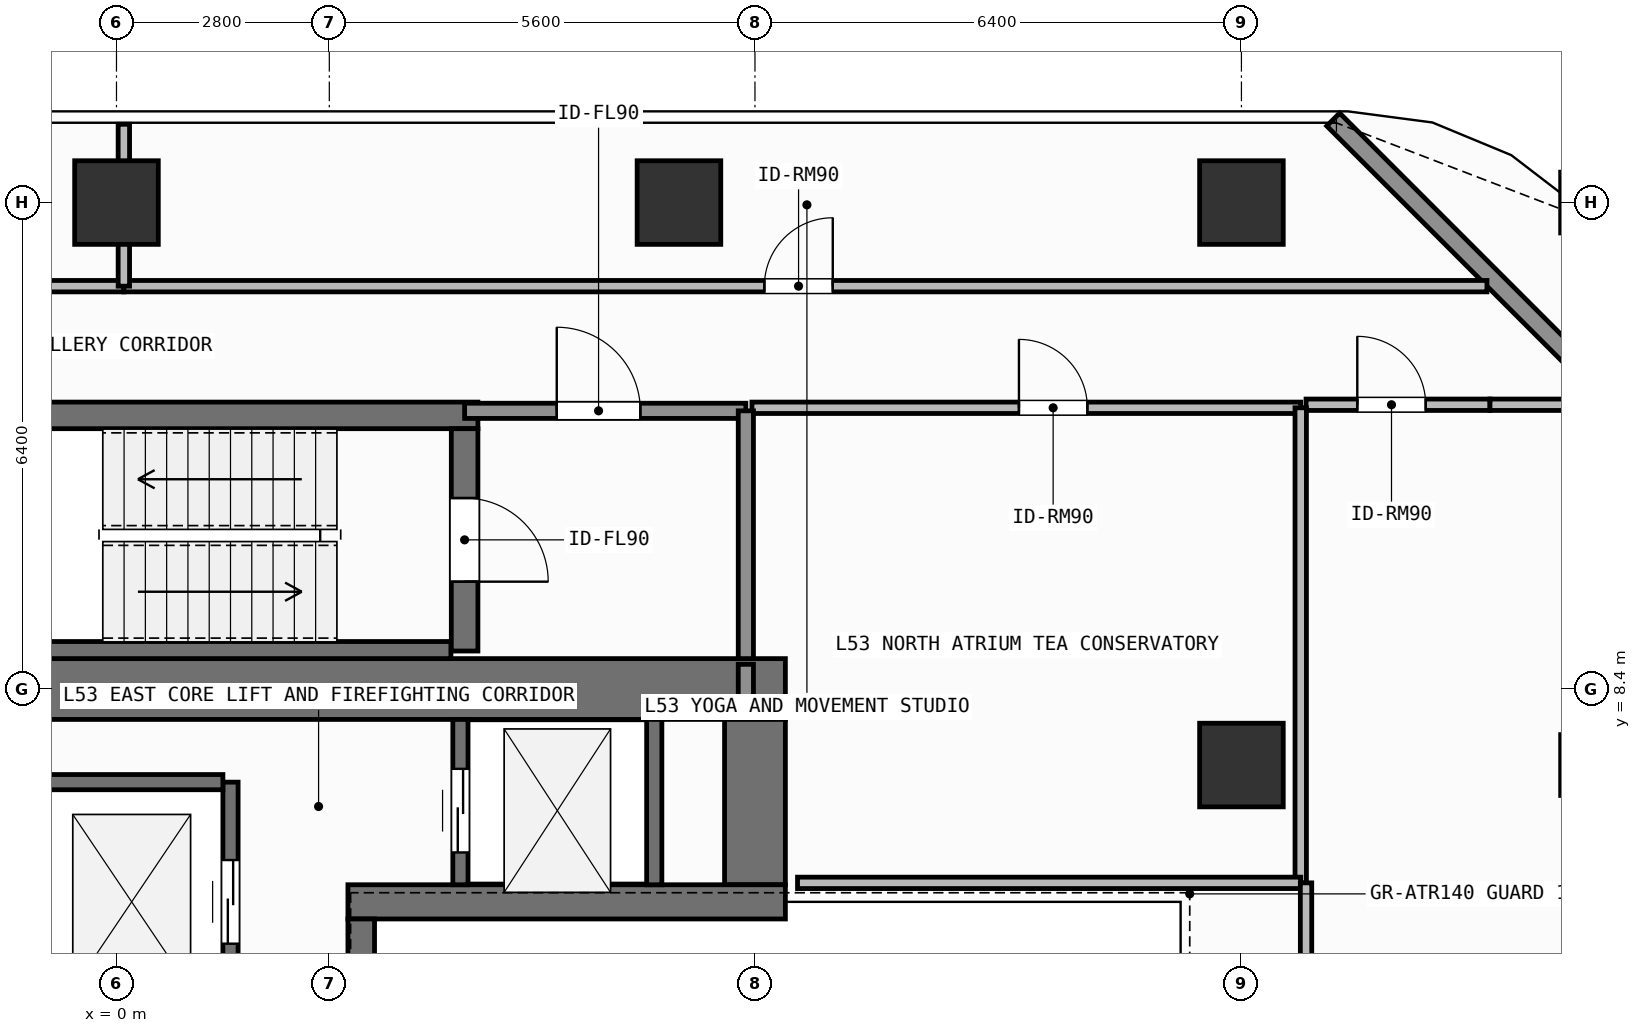
"""IFC4 building model, lengths in metres.
Left out: names, types, materials, properties, quantities, classifications, styles, units other than length and angle.
Written with IfcOpenShell. Run it as: python <this file> out.ifc"""

import sys

from ifc_helpers import new_model, si_unit, direction, frame, frame_2d, origin, origin_2d, place, context, subcontext, project, spatial, rectangle, hollow_rectangle, extrude, element, fill, save


model = new_model("IFC4")
c1 = context("Model", 3, precision=1e-05, world=origin(), true_north=direction((0.0, 1.0)))
c2 = subcontext(c1, "Body", "Model", "MODEL_VIEW")
j1 = project(units=[si_unit("LENGTHUNIT", "METRE"), si_unit("PLANEANGLEUNIT", "RADIAN")], contexts=[c1])
p1 = place(None, origin())
s1 = spatial("IfcSite", under=j1, at=p1, CompositionType="ELEMENT")
p2 = place(p1, origin())
s2 = spatial("IfcBuilding", under=s1, at=p2, CompositionType="ELEMENT")
p3 = place(p2, frame((0.0, 0.0, 215.7)))
s3 = spatial("IfcBuildingStorey", under=s2, at=p3, CompositionType="ELEMENT", Elevation=215.7)
p4 = place(p3, frame((-7.55, 8.4, 0.0), z_axis=(0.0, 0.0, 1.0), x_axis=(1.0, 0.0, 0.0)))
e1 = element("IfcWall", 1, at=p4, inside=s3, PredefinedType="SHEAR", context=c2, shape_type="SweptSolid", body=[
    extrude(rectangle(XDim=16.35, YDim=0.8, at=frame_2d((8.175, 0.0))), origin(), (0.0, 0.0, 1.0), 3.9),
])
p5 = place(p3, frame((8.4, 5.825, 0.0), z_axis=(0.0, 0.0, 1.0), x_axis=(0.0, 1.0, 0.0)))
e2 = element("IfcWall", 2, at=p5, inside=s3, PredefinedType="SHEAR", context=c2, shape_type="SweptSolid", body=[
    extrude(rectangle(XDim=2.175, YDim=0.8, at=frame_2d((1.087, 0.0))), origin(), (0.0, 0.0, 1.0), 3.9),
])
p6 = place(p3, frame((3.045, 5.6, 0.0), z_axis=(0.0, 0.0, 1.0), x_axis=(1.0, 0.0, 0.0)))
e3 = element("IfcWall", 3, at=p6, inside=s3, PredefinedType="SHEAR", context=c2, shape_type="SweptSolid", body=[
    extrude(rectangle(XDim=5.755, YDim=0.45, at=frame_2d((2.877, 0.0))), origin(), (0.0, 0.0, 1.0), 3.9),
])
p7 = place(p3, frame((3.22, -5.375, 0.0), z_axis=(0.0, 0.0, 1.0), x_axis=(0.0, 1.0, 0.0)))
e4 = element("IfcWall", 4, at=p7, inside=s3, PredefinedType="SHEAR", context=c2, shape_type="SweptSolid", body=[
    extrude(rectangle(XDim=10.75, YDim=0.35, at=frame_2d((5.375, 0.0))), origin(), (0.0, 0.0, 1.0), 3.9),
])
p8 = place(p3, frame((-2.555, 12.0, 0.0), z_axis=(0.0, 0.0, 1.0), x_axis=(1.0, 0.0, 0.0)))
e5 = element("IfcWall", 5, at=p8, inside=s3, PredefinedType="SHEAR", context=c2, shape_type="SweptSolid", body=[
    extrude(rectangle(XDim=7.31, YDim=0.35, at=frame_2d((3.655, 0.0))), origin(), (0.0, 0.0, 1.0), 3.9),
])
p9 = place(p3, frame((-2.2, 8.913, 0.0), z_axis=(0.0, 0.0, 1.0), x_axis=(1.0, 0.0, 0.0)))
e6 = element("IfcWall", 6, at=p9, inside=s3, PredefinedType="SHEAR", context=c2, shape_type="SweptSolid", body=[
    extrude(rectangle(XDim=6.6, YDim=0.225, at=frame_2d((3.3, 0.0))), origin(), (0.0, 0.0, 1.0), 3.9),
])
p10 = place(p3, frame((4.58, 11.825, 0.0), z_axis=(0.0, 0.0, 1.0), x_axis=(0.0, -1.0, 0.0)))
e7 = element("IfcWall", 7, at=p10, inside=s3, PredefinedType="SHEAR", context=c2, shape_type="SweptSolid", body=[
    extrude(rectangle(XDim=2.925, YDim=0.35, at=frame_2d((1.462, 0.0))), origin(), (0.0, 0.0, 1.0), 3.9),
])
p11 = place(p10, frame((0.913, 0.0, 0.0)))
e8 = element("IfcOpeningElement", 8, at=p11, cuts=e7, PredefinedType="OPENING", context=c2, shape_type="SweptSolid", body=[
    extrude(rectangle(XDim=1.1, YDim=2.15, at=frame_2d((0.55, 1.075))), frame((0.0, 0.185, 0.0), z_axis=(0.0, -1.0, 0.0), x_axis=(1.0, 0.0, 0.0)), (0.0, 0.0, 1.0), 0.37),
])
for number, where, z_axis, x_axis in (
    (9, (0.0, 14.8, 0.0), (0.0, 0.0, 1.0), (1.0, 0.0, 0.0)),
    (10, (7.4, 14.8, 0.0), (0.0, 0.0, 1.0), (1.0, 0.0, 0.0)),
    (11, (14.8, 14.8, 0.0), (0.0, 0.0, 1.0), (1.0, 0.0, 0.0)),
    (12, (14.8, 7.4, 0.0), (0.0, 0.0, 1.0), (1.0, 0.0, 0.0)),
):
    element("IfcColumn", number, at=place(p3, frame(where, z_axis=z_axis, x_axis=x_axis)), inside=s3, PredefinedType="COLUMN", context=c2, shape_type="SweptSolid", body=[
        extrude(rectangle(XDim=1.1, YDim=1.1, at=origin_2d()), origin(), (0.0, 0.0, 1.0), 3.9),
    ])
for number, where, z_axis, x_axis in (
    (13, (19.4, 7.4, 0.0), (0.0, 0.0, 1.0), (1.0, 0.0, 0.0)),
    (14, (19.4, 14.8, 0.0), (0.0, 0.0, 1.0), (1.0, 0.0, 0.0)),
):
    element("IfcColumn", number, at=place(p3, frame(where, z_axis=z_axis, x_axis=x_axis)), inside=s3, PredefinedType="COLUMN", context=c2, shape_type="SweptSolid", body=[
        extrude(hollow_rectangle(XDim=0.8, YDim=0.8, WallThickness=0.036, at=origin_2d()), origin(), (0.0, 0.0, 1.0), 3.9),
    ])
p12 = place(p3, frame((16.008, 15.892, 0.0), z_axis=(0.0, 0.0, 1.0), x_axis=(0.707106781187, -0.707106781187, 0.0)))
e15 = element("IfcWall", 15, at=p12, inside=s3, PredefinedType="SOLIDWALL", context=c2, shape_type="SweptSolid", body=[
    extrude(rectangle(XDim=6.201, YDim=0.24, at=frame_2d((3.101, 0.0))), origin(), (0.0, 0.0, 1.0), 3.62),
])
p13 = place(p3, frame((1.5, 4.025, 0.0), z_axis=(0.0, 0.0, 1.0), x_axis=(0.0, 1.0, 0.0)))
e16 = element("IfcWall", 16, at=p13, inside=s3, PredefinedType="SHEAR", context=c2, shape_type="SweptSolid", body=[
    extrude(rectangle(XDim=3.15, YDim=0.2, at=frame_2d((1.575, 0.0))), origin(), (0.0, 0.0, 1.0), 3.62),
])
p14 = place(p13, frame((1.025, 0.0, 0.0)))
e17 = element("IfcOpeningElement", 17, at=p14, cuts=e16, PredefinedType="OPENING", context=c2, shape_type="SweptSolid", body=[
    extrude(rectangle(XDim=1.1, YDim=2.2, at=frame_2d((0.55, 1.1))), frame((0.0, 0.11, 0.0), z_axis=(0.0, -1.0, 0.0), x_axis=(1.0, 0.0, 0.0)), (0.0, 0.0, 1.0), 0.22),
])
p15 = place(p3, frame((-1.0, 7.175, 0.0), z_axis=(0.0, 0.0, 1.0), x_axis=(1.0, 0.0, 0.0)))
e18 = element("IfcWall", 18, at=p15, inside=s3, PredefinedType="SHEAR", context=c2, shape_type="SweptSolid", body=[
    extrude(rectangle(XDim=2.4, YDim=0.2, at=frame_2d((1.2, 0.0))), origin(), (0.0, 0.0, 1.0), 3.62),
])
p16 = place(p3, frame((4.525, 5.825, 0.0), z_axis=(0.0, 0.0, 1.0), x_axis=(0.0, 1.0, 0.0)))
e19 = element("IfcWall", 19, at=p16, inside=s3, PredefinedType="SHEAR", context=c2, shape_type="SweptSolid", body=[
    extrude(rectangle(XDim=2.175, YDim=0.2, at=frame_2d((1.087, 0.0))), origin(), (0.0, 0.0, 1.0), 3.62),
])
p17 = place(p16, frame((0.425, 0.0, 0.0)))
e20 = element("IfcOpeningElement", 20, at=p17, cuts=e19, PredefinedType="OPENING", context=c2, shape_type="SweptSolid", body=[
    extrude(rectangle(XDim=1.1, YDim=2.2, at=frame_2d((0.55, 1.1))), frame((0.0, 0.11, 0.0), z_axis=(0.0, -1.0, 0.0), x_axis=(1.0, 0.0, 0.0)), (0.0, 0.0, 1.0), 0.22),
])
p18 = place(p3, frame((7.075, 5.825, 0.0), z_axis=(0.0, 0.0, 1.0), x_axis=(0.0, 1.0, 0.0)))
e21 = element("IfcWall", 21, at=p18, inside=s3, PredefinedType="SHEAR", context=c2, shape_type="SweptSolid", body=[
    extrude(rectangle(XDim=2.175, YDim=0.2, at=frame_2d((1.087, 0.0))), origin(), (0.0, 0.0, 1.0), 3.62),
])
p19 = place(p3, frame((4.58, 12.06, 0.0), z_axis=(0.0, 0.0, 1.0), x_axis=(1.0, 0.0, 0.0)))
e22 = element("IfcWall", 22, at=p19, inside=s3, PredefinedType="SOLIDWALL", context=c2, shape_type="SweptSolid", body=[
    extrude(rectangle(XDim=3.7, YDim=0.2, at=frame_2d((1.85, 0.0))), origin(), (0.0, 0.0, 1.0), 3.62),
])
p20 = place(p19, frame((1.212, 0.0, 0.0)))
e23 = element("IfcOpeningElement", 23, at=p20, cuts=e22, PredefinedType="OPENING", context=c2, shape_type="SweptSolid", body=[
    extrude(rectangle(XDim=1.1, YDim=2.15, at=frame_2d((0.55, 1.075))), frame((0.0, 0.11, 0.0), z_axis=(0.0, -1.0, 0.0), x_axis=(1.0, 0.0, 0.0)), (0.0, 0.0, 1.0), 0.22),
])
p21 = place(p3, frame((8.36, 12.1, 0.0), z_axis=(0.0, 0.0, 1.0), x_axis=(1.0, 0.0, 0.0)))
e24 = element("IfcWall", 24, at=p21, inside=s3, PredefinedType="PARTITIONING", context=c2, shape_type="SweptSolid", body=[
    extrude(rectangle(XDim=7.22, YDim=0.15, at=frame_2d((3.61, 0.0))), origin(), (0.0, 0.0, 1.0), 3.62),
])
p22 = place(p21, frame((3.513, 0.0, 0.0)))
e25 = element("IfcOpeningElement", 25, at=p22, cuts=e24, PredefinedType="OPENING", context=c2, shape_type="SweptSolid", body=[
    extrude(rectangle(XDim=0.9, YDim=2.1, at=frame_2d((0.45, 1.05))), frame((0.0, 0.085, 0.0), z_axis=(0.0, -1.0, 0.0), x_axis=(1.0, 0.0, 0.0)), (0.0, 0.0, 1.0), 0.17),
])
p23 = place(p3, frame((-13.483, 13.7, 0.0), z_axis=(0.0, 0.0, 1.0), x_axis=(1.0, 0.0, 0.0)))
e26 = element("IfcWall", 26, at=p23, inside=s3, PredefinedType="PARTITIONING", context=c2, shape_type="SweptSolid", body=[
    extrude(rectangle(XDim=13.58, YDim=0.15, at=frame_2d((6.79, 0.0))), origin(), (0.0, 0.0, 1.0), 3.62),
])
p24 = place(p23, frame((6.788, 0.0, 0.0)))
e27 = element("IfcOpeningElement", 27, at=p24, cuts=e26, PredefinedType="OPENING", context=c2, shape_type="SweptSolid", body=[
    extrude(rectangle(XDim=0.9, YDim=2.1, at=frame_2d((0.45, 1.05))), frame((0.0, 0.085, 0.0), z_axis=(0.0, -1.0, 0.0), x_axis=(1.0, 0.0, 0.0)), (0.0, 0.0, 1.0), 0.17),
])
p25 = place(p3, frame((0.097, 13.7, 0.0), z_axis=(0.0, 0.0, 1.0), x_axis=(1.0, 0.0, 0.0)))
e28 = element("IfcWall", 28, at=p25, inside=s3, PredefinedType="PARTITIONING", context=c2, shape_type="SweptSolid", body=[
    extrude(rectangle(XDim=17.933, YDim=0.15, at=frame_2d((8.967, 0.0))), origin(), (0.0, 0.0, 1.0), 3.62),
])
p26 = place(p25, frame((8.427, 0.0, 0.0)))
e29 = element("IfcOpeningElement", 29, at=p26, cuts=e28, PredefinedType="OPENING", context=c2, shape_type="SweptSolid", body=[
    extrude(rectangle(XDim=0.9, YDim=2.1, at=frame_2d((0.45, 1.05))), frame((0.0, 0.085, 0.0), z_axis=(0.0, -1.0, 0.0), x_axis=(1.0, 0.0, 0.0)), (0.0, 0.0, 1.0), 0.17),
])
p27 = place(p3, frame((15.65, 12.14, 0.0), z_axis=(0.0, 0.0, 1.0), x_axis=(1.0, 0.0, 0.0)))
e30 = element("IfcWall", 30, at=p27, inside=s3, PredefinedType="PARTITIONING", context=c2, shape_type="SweptSolid", body=[
    extrude(rectangle(XDim=2.42, YDim=0.15, at=frame_2d((1.21, 0.0))), origin(), (0.0, 0.0, 1.0), 3.62),
])
p28 = place(p27, frame((0.674, 0.0, 0.0)))
e31 = element("IfcOpeningElement", 31, at=p28, cuts=e30, PredefinedType="OPENING", context=c2, shape_type="SweptSolid", body=[
    extrude(rectangle(XDim=0.9, YDim=2.1, at=frame_2d((0.45, 1.05))), frame((0.0, 0.085, 0.0), z_axis=(0.0, -1.0, 0.0), x_axis=(1.0, 0.0, 0.0)), (0.0, 0.0, 1.0), 0.17),
])
p29 = place(p3, frame((8.28, 8.8, 0.0), z_axis=(0.0, 0.0, 1.0), x_axis=(0.0, 1.0, 0.0)))
e32 = element("IfcWall", 32, at=p29, inside=s3, PredefinedType="SOLIDWALL", context=c2, shape_type="SweptSolid", body=[
    extrude(rectangle(XDim=3.26, YDim=0.2, at=frame_2d((1.63, 0.0))), origin(), (0.0, 0.0, 1.0), 3.62),
])
p30 = place(p3, frame((8.28, 8.1, 0.0), z_axis=(0.0, 0.0, 1.0), x_axis=(0.0, 1.0, 0.0)))
e33 = element("IfcWall", 33, at=p30, inside=s3, PredefinedType="SOLIDWALL", context=c2, shape_type="SweptSolid", body=[
    extrude(rectangle(XDim=0.625, YDim=0.2, at=frame_2d((0.312, 0.0))), origin(), (0.0, 0.0, 1.0), 3.62),
])
p31 = place(p3, frame((15.58, 5.85, 0.0), z_axis=(0.0, 0.0, 1.0), x_axis=(0.0, 1.0, 0.0)))
e34 = element("IfcWall", 34, at=p31, inside=s3, PredefinedType="PARTITIONING", context=c2, shape_type="SweptSolid", body=[
    extrude(rectangle(XDim=6.25, YDim=0.15, at=frame_2d((3.125, 0.0))), origin(), (0.0, 0.0, 1.0), 3.62),
])
p32 = place(p3, frame((8.96, 5.85, 0.0), z_axis=(0.0, 0.0, 1.0), x_axis=(1.0, 0.0, 0.0)))
e35 = element("IfcWall", 35, at=p32, inside=s3, PredefinedType="PARTITIONING", context=c2, shape_type="SweptSolid", body=[
    extrude(rectangle(XDim=6.62, YDim=0.15, at=frame_2d((3.31, 0.0))), origin(), (0.0, 0.0, 1.0), 3.62),
])
p33 = place(p3, frame((0.097, 13.7, 0.0), z_axis=(0.0, 0.0, 1.0), x_axis=(0.0, 1.0, 0.0)))
e36 = element("IfcWall", 36, at=p33, inside=s3, PredefinedType="PARTITIONING", context=c2, shape_type="SweptSolid", body=[
    extrude(rectangle(XDim=2.13, YDim=0.15, at=frame_2d((1.065, 0.0))), origin(), (0.0, 0.0, 1.0), 3.62),
])
p34 = place(p3, frame((15.65, -2.75, 0.0), z_axis=(0.0, 0.0, 1.0), x_axis=(0.0, 1.0, 0.0)))
e37 = element("IfcWall", 37, at=p34, inside=s3, PredefinedType="PARTITIONING", context=c2, shape_type="SweptSolid", body=[
    extrude(rectangle(XDim=8.6, YDim=0.15, at=frame_2d((4.3, 0.0))), origin(), (0.0, 0.0, 1.0), 3.62),
])
p35 = place(p3, frame((18.07, 12.14, 0.0), z_axis=(0.0, 0.0, 1.0), x_axis=(1.0, 0.0, 0.0)))
e38 = element("IfcWall", 38, at=p35, inside=s3, PredefinedType="PARTITIONING", context=c2, shape_type="SweptSolid", body=[
    extrude(rectangle(XDim=1.52, YDim=0.15, at=frame_2d((0.76, 0.0))), origin(), (0.0, 0.0, 1.0), 3.62),
])
p36 = place(p14, origin())
e39 = element("IfcDoor", 39, at=p36, inside=s3, OperationType="SLIDING_TO_LEFT", PredefinedType="DOOR", context=c2, shape_type="SweptSolid", body=[
    extrude(rectangle(XDim=1.1, YDim=2.2, at=frame_2d((0.55, 1.1))), frame((0.0, 0.025, 0.0), z_axis=(0.0, -1.0, 0.0), x_axis=(1.0, 0.0, 0.0)), (0.0, 0.0, 1.0), 0.05),
])
fill(e17, e39)
p37 = place(p17, origin())
e40 = element("IfcDoor", 40, at=p37, inside=s3, OperationType="SLIDING_TO_LEFT", PredefinedType="DOOR", context=c2, shape_type="SweptSolid", body=[
    extrude(rectangle(XDim=1.1, YDim=2.2, at=frame_2d((0.55, 1.1))), frame((0.0, 0.025, 0.0), z_axis=(0.0, -1.0, 0.0), x_axis=(1.0, 0.0, 0.0)), (0.0, 0.0, 1.0), 0.05),
])
fill(e20, e40)
p38 = place(p11, origin())
e41 = element("IfcDoor", 41, at=p38, inside=s3, OperationType="SINGLE_SWING_RIGHT", PredefinedType="DOOR", context=c2, shape_type="SweptSolid", body=[
    extrude(rectangle(XDim=1.1, YDim=2.15, at=frame_2d((0.55, 1.075))), frame((0.0, 0.025, 0.0), z_axis=(0.0, -1.0, 0.0), x_axis=(1.0, 0.0, 0.0)), (0.0, 0.0, 1.0), 0.05),
])
fill(e8, e41)
p39 = place(p20, origin())
e42 = element("IfcDoor", 42, at=p39, inside=s3, OperationType="SINGLE_SWING_LEFT", PredefinedType="DOOR", context=c2, shape_type="SweptSolid", body=[
    extrude(rectangle(XDim=1.1, YDim=2.15, at=frame_2d((0.55, 1.075))), frame((0.0, 0.025, 0.0), z_axis=(0.0, -1.0, 0.0), x_axis=(1.0, 0.0, 0.0)), (0.0, 0.0, 1.0), 0.05),
])
fill(e23, e42)
p40 = place(p22, origin())
e43 = element("IfcDoor", 43, at=p40, inside=s3, OperationType="SINGLE_SWING_LEFT", PredefinedType="DOOR", context=c2, shape_type="SweptSolid", body=[
    extrude(rectangle(XDim=0.9, YDim=2.1, at=frame_2d((0.45, 1.05))), frame((0.0, 0.025, 0.0), z_axis=(0.0, -1.0, 0.0), x_axis=(1.0, 0.0, 0.0)), (0.0, 0.0, 1.0), 0.05),
])
fill(e25, e43)
p41 = place(p26, origin())
e44 = element("IfcDoor", 44, at=p41, inside=s3, OperationType="SINGLE_SWING_RIGHT", PredefinedType="DOOR", context=c2, shape_type="SweptSolid", body=[
    extrude(rectangle(XDim=0.9, YDim=2.1, at=frame_2d((0.45, 1.05))), frame((0.0, 0.025, 0.0), z_axis=(0.0, -1.0, 0.0), x_axis=(1.0, 0.0, 0.0)), (0.0, 0.0, 1.0), 0.05),
])
fill(e29, e44)
p42 = place(p28, origin())
e45 = element("IfcDoor", 45, at=p42, inside=s3, OperationType="SINGLE_SWING_LEFT", PredefinedType="DOOR", context=c2, shape_type="SweptSolid", body=[
    extrude(rectangle(XDim=0.9, YDim=2.1, at=frame_2d((0.45, 1.05))), frame((0.0, 0.025, 0.0), z_axis=(0.0, -1.0, 0.0), x_axis=(1.0, 0.0, 0.0)), (0.0, 0.0, 1.0), 0.05),
])
fill(e31, e45)
save(model, sys.argv[1])
